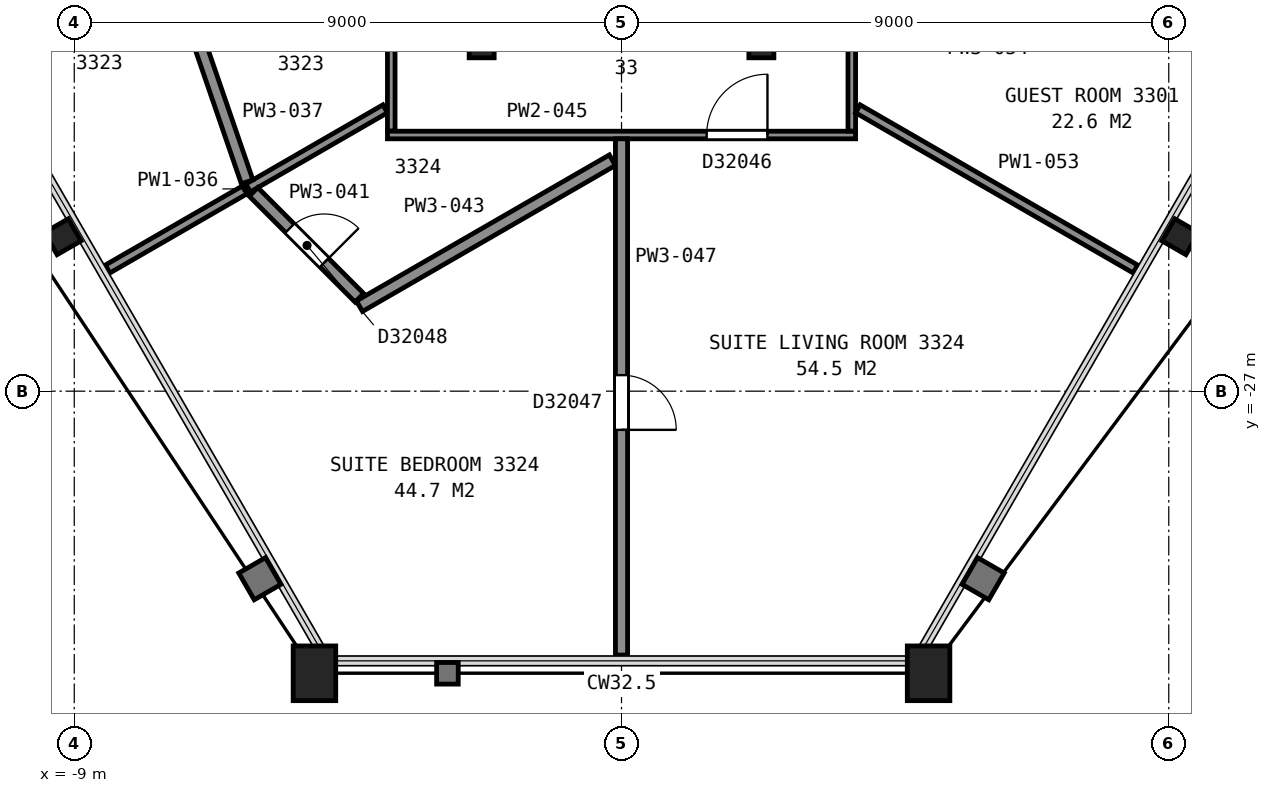
"""IFC4 building model, lengths in metres.
Left out: names, types, materials, properties, quantities, classifications, styles, units other than length and angle.
Written with IfcOpenShell. Run it as: python <this file> out.ifc"""

import sys

from ifc_helpers import new_model, si_unit, direction, frame, frame_2d, origin, origin_2d, place, context, subcontext, project, spatial, rectangle, hollow_rectangle, i_section, extrude, element, fill, save


model = new_model("IFC4")
c1 = context("Model", 3, precision=1e-05, world=origin(), true_north=direction((0.0, 1.0)))
c2 = subcontext(c1, "Body", "Model", "MODEL_VIEW")
j1 = project(units=[si_unit("LENGTHUNIT", "METRE"), si_unit("PLANEANGLEUNIT", "RADIAN")], contexts=[c1])
p1 = place(None, origin())
s1 = spatial("IfcSite", under=j1, at=p1, CompositionType="ELEMENT")
p2 = place(p1, origin())
s2 = spatial("IfcBuilding", under=s1, at=p2, CompositionType="ELEMENT")
p3 = place(p2, frame((0.0, 0.0, 136.0)))
s3 = spatial("IfcBuildingStorey", under=s2, at=p3, CompositionType="ELEMENT", Elevation=136.0)
p4 = place(p3, frame((-9.19, -24.46, 0.0), z_axis=(0.0, 0.0, 1.0), x_axis=(-0.5, 0.866025403784, 0.0)))
e1 = element("IfcColumn", 1, at=p4, inside=s3, PredefinedType="COLUMN", context=c2, shape_type="SweptSolid", body=[
    extrude(i_section(OverallWidth=0.419, OverallDepth=0.455, WebThickness=0.042, FlangeThickness=0.068, FilletRadius=0.015, at=origin_2d()), origin(), (0.0, 0.0, 1.0), 3.6),
])
for number, where, z_axis, x_axis in (
    (2, (-5.05, -31.64, 0.0), (0.0, 0.0, 1.0), (-1.0, 0.0, 0.0)),
    (3, (5.05, -31.64, 0.0), (0.0, 0.0, 1.0), (-1.0, 0.0, 0.0)),
):
    element("IfcColumn", number, at=place(p3, frame(where, z_axis=z_axis, x_axis=x_axis)), inside=s3, PredefinedType="COLUMN", context=c2, shape_type="SweptSolid", body=[
        extrude(hollow_rectangle(XDim=0.7, YDim=0.9, WallThickness=0.065, at=origin_2d()), origin(), (0.0, 0.0, 1.0), 3.6),
    ])
p5 = place(p3, frame((9.19, -24.46, 0.0), z_axis=(0.0, 0.0, 1.0), x_axis=(-0.5, -0.866025403784, 0.0)))
e4 = element("IfcColumn", 4, at=p5, inside=s3, PredefinedType="COLUMN", context=c2, shape_type="SweptSolid", body=[
    extrude(i_section(OverallWidth=0.419, OverallDepth=0.455, WebThickness=0.042, FlangeThickness=0.068, FilletRadius=0.015, at=origin_2d()), origin(), (0.0, 0.0, 1.0), 3.6),
])
for number, where, z_axis, x_axis in (
    (5, (-2.3, -21.3, 0.0), (0.0, 0.0, 1.0), (-1.0, 0.0, 0.0)),
    (6, (2.3, -21.3, 0.0), (0.0, 0.0, 1.0), (-1.0, 0.0, 0.0)),
):
    element("IfcColumn", number, at=place(p3, frame(where, z_axis=z_axis, x_axis=x_axis)), inside=s3, PredefinedType="COLUMN", context=c2, shape_type="SweptSolid", body=[
        extrude(i_section(OverallWidth=0.411, OverallDepth=0.434, WebThickness=0.036, FlangeThickness=0.057, FilletRadius=0.015, at=origin_2d()), origin(), (0.0, 0.0, 1.0), 3.6),
    ])
p6 = place(p3, frame((-8.452, -24.991, 0.0), z_axis=(0.0, 0.0, 1.0), x_axis=(0.866039804031, 0.499975057213, 0.0)))
e7 = element("IfcWall", 7, at=p6, inside=s3, PredefinedType="PARTITIONING", context=c2, shape_type="SweptSolid", body=[
    extrude(rectangle(XDim=5.271, YDim=0.15, at=frame_2d((2.635, 0.0))), origin(), (0.0, 0.0, 1.0), 2.613),
])
p7 = place(p3, frame((-6.948, -21.257, 0.0), z_axis=(0.0, 0.0, 1.0), x_axis=(0.325034895309, -0.945702023278, 0.0)))
e8 = element("IfcWall", 8, at=p7, inside=s3, PredefinedType="PARTITIONING", context=c2, shape_type="SweptSolid", body=[
    extrude(rectangle(XDim=2.433, YDim=0.2, at=frame_2d((1.216, 0.0))), origin(), (0.0, 0.0, 1.0), 2.613),
])
p8 = place(p3, frame((-6.052, -23.722, 0.0), z_axis=(0.0, 0.0, 1.0), x_axis=(0.706958057502, -0.707255473597, 0.0)))
e9 = element("IfcWall", 9, at=p8, inside=s3, PredefinedType="PARTITIONING", context=c2, shape_type="SweptSolid", body=[
    extrude(rectangle(XDim=2.463, YDim=0.2, at=frame_2d((1.231, 0.0))), origin(), (0.0, 0.0, 1.0), 2.613),
])
p9 = place(p8, frame((0.846, 0.0, 0.0)))
e10 = element("IfcOpeningElement", 10, at=p9, cuts=e9, PredefinedType="OPENING", context=c2, shape_type="SweptSolid", body=[
    extrude(rectangle(XDim=0.8, YDim=2.1, at=frame_2d((0.4, 1.05))), frame((0.0, 0.11, 0.0), z_axis=(0.0, -1.0, 0.0), x_axis=(1.0, 0.0, 0.0)), (0.0, 0.0, 1.0), 0.22),
])
p10 = place(p3, frame((-4.31, -25.602, 0.0), z_axis=(0.0, 0.0, 1.0), x_axis=(0.866045077667, 0.499965922287, 0.0)))
e11 = element("IfcWall", 11, at=p10, inside=s3, PredefinedType="PARTITIONING", context=c2, shape_type="SweptSolid", body=[
    extrude(rectangle(XDim=4.803, YDim=0.2, at=frame_2d((2.401, 0.0))), origin(), (0.0, 0.0, 1.0), 2.613),
])
p11 = place(p3, frame((-3.787, -22.722, 0.0), z_axis=(0.0, 0.0, 1.0), x_axis=(0.0, 1.0, 0.0)))
e12 = element("IfcWall", 12, at=p11, inside=s3, PredefinedType="PARTITIONING", context=c2, shape_type="SweptSolid", body=[
    extrude(rectangle(XDim=6.875, YDim=0.125, at=frame_2d((3.438, 0.0))), origin(), (0.0, 0.0, 1.0), 2.613),
])
p12 = place(p3, frame((3.85, -22.787, 0.0), z_axis=(0.0, 0.0, 1.0), x_axis=(-1.0, 0.0, 0.0)))
e13 = element("IfcWall", 13, at=p12, inside=s3, PredefinedType="PARTITIONING", context=c2, shape_type="SweptSolid", body=[
    extrude(rectangle(XDim=7.699, YDim=0.125, at=frame_2d((3.85, 0.0))), origin(), (0.0, 0.0, 1.0), 2.613),
])
p13 = place(p12, frame((1.449, 0.0, 0.0)))
e14 = element("IfcOpeningElement", 14, at=p13, cuts=e13, PredefinedType="OPENING", context=c2, shape_type="SweptSolid", body=[
    extrude(rectangle(XDim=1.0, YDim=2.1, at=frame_2d((0.5, 1.05))), frame((0.0, 0.073, 0.0), z_axis=(0.0, -1.0, 0.0), x_axis=(1.0, 0.0, 0.0)), (0.0, 0.0, 1.0), 0.145),
])
p14 = place(p3, frame((0.0, -31.34, 0.0), z_axis=(0.0, 0.0, 1.0), x_axis=(0.0, 1.0, 0.0)))
e15 = element("IfcWall", 15, at=p14, inside=s3, PredefinedType="PARTITIONING", context=c2, shape_type="SweptSolid", body=[
    extrude(rectangle(XDim=8.49, YDim=0.2, at=frame_2d((4.245, 0.0))), origin(), (0.0, 0.0, 1.0), 2.613),
])
p15 = place(p14, frame((3.704, 0.0, 0.0)))
e16 = element("IfcOpeningElement", 16, at=p15, cuts=e15, PredefinedType="OPENING", context=c2, shape_type="SweptSolid", body=[
    extrude(rectangle(XDim=0.9, YDim=2.1, at=frame_2d((0.45, 1.05))), frame((0.0, 0.11, 0.0), z_axis=(0.0, -1.0, 0.0), x_axis=(1.0, 0.0, 0.0)), (0.0, 0.0, 1.0), 0.22),
])
p16 = place(p3, frame((3.787, -15.847, 0.0), z_axis=(0.0, 0.0, 1.0), x_axis=(0.0, -1.0, 0.0)))
e17 = element("IfcWall", 17, at=p16, inside=s3, PredefinedType="PARTITIONING", context=c2, shape_type="SweptSolid", body=[
    extrude(rectangle(XDim=6.875, YDim=0.125, at=frame_2d((3.438, 0.0))), origin(), (0.0, 0.0, 1.0), 2.613),
])
p17 = place(p16, frame((4.551, 0.0, 0.0)))
e18 = element("IfcOpeningElement", 18, at=p17, cuts=e17, PredefinedType="OPENING", context=c2, shape_type="SweptSolid", body=[
    extrude(rectangle(XDim=0.9, YDim=2.1, at=frame_2d((0.45, 1.05))), frame((0.0, 0.073, 0.0), z_axis=(0.0, -1.0, 0.0), x_axis=(1.0, 0.0, 0.0)), (0.0, 0.0, 1.0), 0.145),
])
p18 = place(p3, frame((3.887, -22.356, 0.0), z_axis=(0.0, 0.0, 1.0), x_axis=(0.866039804031, -0.499975057213, 0.0)))
e19 = element("IfcWall", 19, at=p18, inside=s3, PredefinedType="PARTITIONING", context=c2, shape_type="SweptSolid", body=[
    extrude(rectangle(XDim=5.271, YDim=0.15, at=frame_2d((2.635, 0.0))), origin(), (0.0, 0.0, 1.0), 2.613),
])
p19 = place(p9, origin())
e20 = element("IfcDoor", 20, at=p19, inside=s3, OperationType="SINGLE_SWING_RIGHT", PredefinedType="DOOR", context=c2, shape_type="SweptSolid", body=[
    extrude(rectangle(XDim=0.8, YDim=2.1, at=frame_2d((0.4, 1.05))), frame((0.0, 0.025, 0.0), z_axis=(0.0, -1.0, 0.0), x_axis=(1.0, 0.0, 0.0)), (0.0, 0.0, 1.0), 0.05),
])
fill(e10, e20)
p20 = place(p13, origin())
e21 = element("IfcDoor", 21, at=p20, inside=s3, OperationType="SINGLE_SWING_LEFT", PredefinedType="DOOR", context=c2, shape_type="SweptSolid", body=[
    extrude(rectangle(XDim=1.0, YDim=2.1, at=frame_2d((0.5, 1.05))), frame((0.0, 0.025, 0.0), z_axis=(0.0, -1.0, 0.0), x_axis=(1.0, 0.0, 0.0)), (0.0, 0.0, 1.0), 0.05),
])
fill(e14, e21)
p21 = place(p15, origin())
e22 = element("IfcDoor", 22, at=p21, inside=s3, OperationType="SINGLE_SWING_LEFT", PredefinedType="DOOR", context=c2, shape_type="SweptSolid", body=[
    extrude(rectangle(XDim=0.9, YDim=2.1, at=frame_2d((0.45, 1.05))), frame((0.0, 0.025, 0.0), z_axis=(0.0, -1.0, 0.0), x_axis=(1.0, 0.0, 0.0)), (0.0, 0.0, 1.0), 0.05),
])
fill(e16, e22)
save(model, sys.argv[1])
